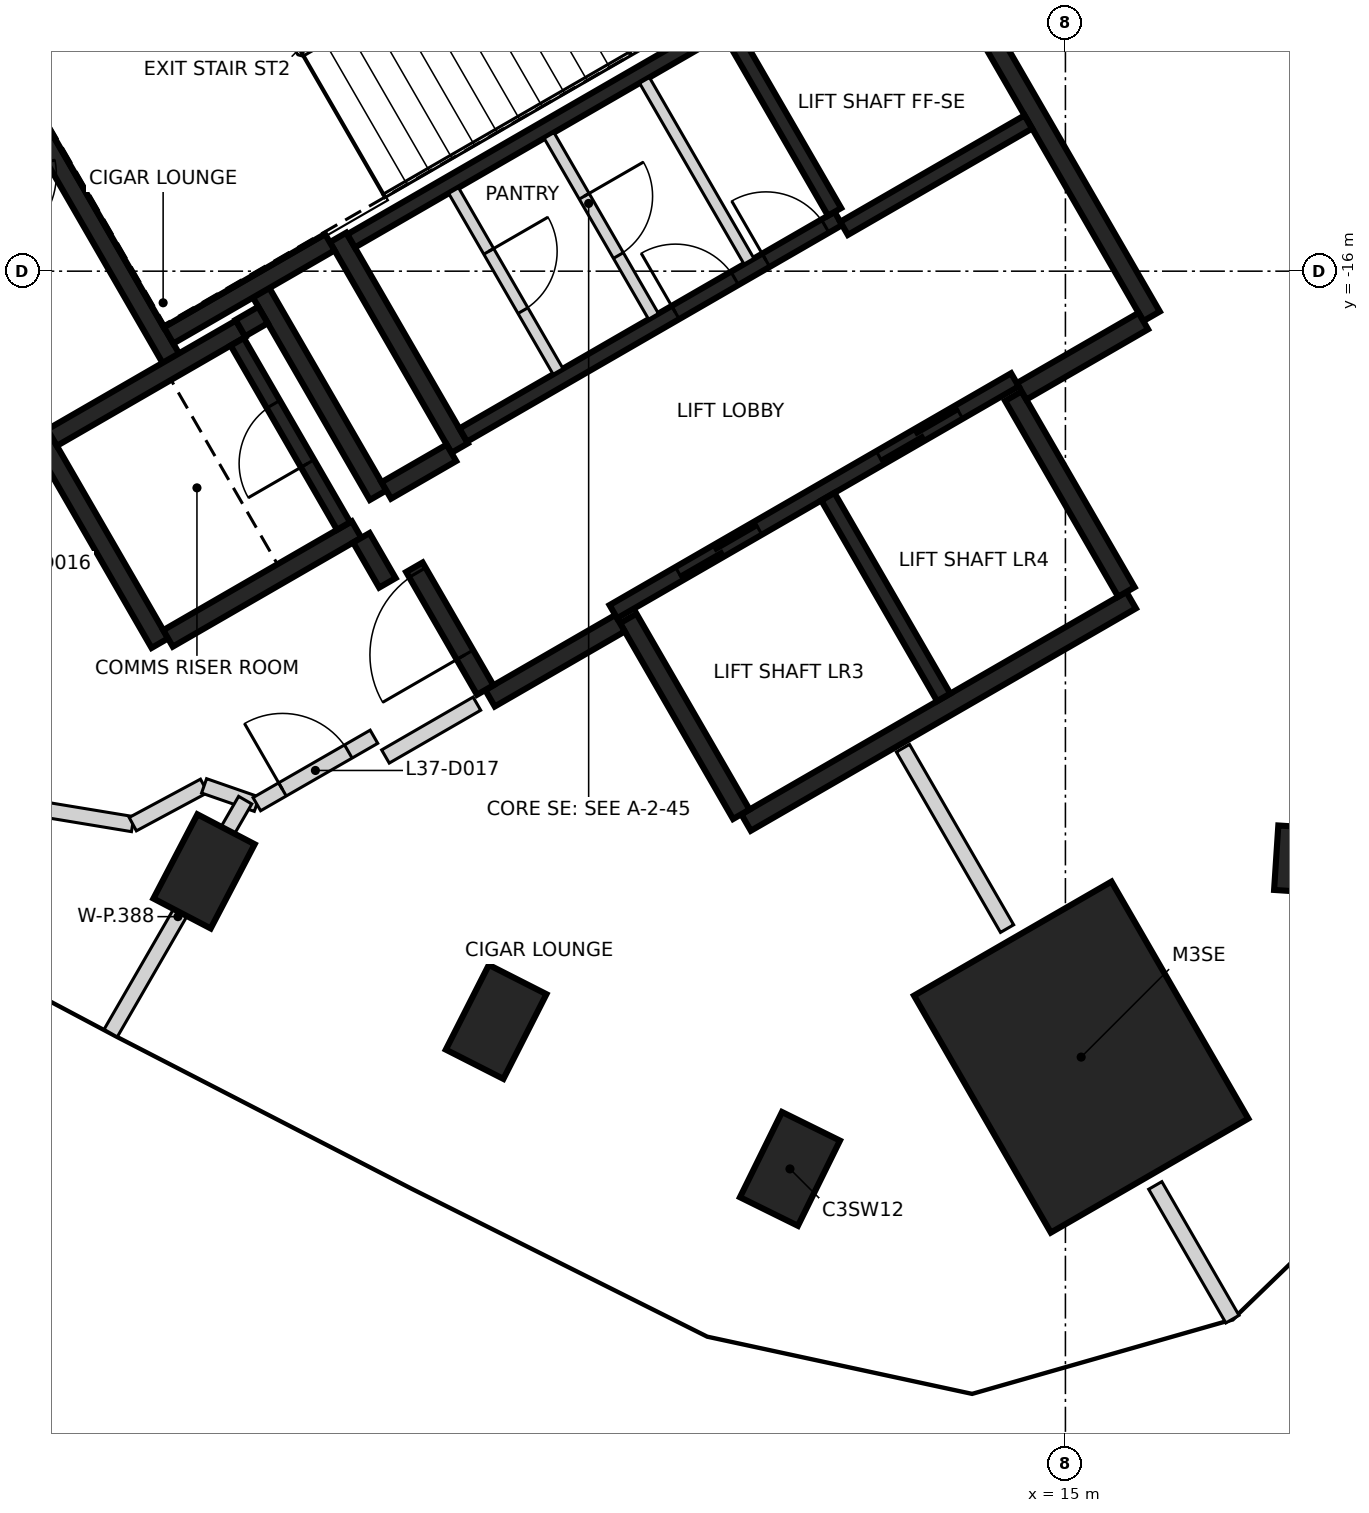
"""IFC4 building model, lengths in metres.
Left out: names, types, materials, properties, quantities, classifications, styles, units other than length and angle.
Written with IfcOpenShell. Run it as: python <this file> out.ifc"""

import sys

from ifc_helpers import new_model, si_unit, direction, frame, frame_2d, origin, origin_2d, place, context, subcontext, project, spatial, rectangle, extrude, element, fill, save


model = new_model("IFC4")
c1 = context("Model", 3, precision=1e-05, world=origin(), true_north=direction((0.0, 1.0)))
c2 = subcontext(c1, "Body", "Model", "MODEL_VIEW")
j1 = project(units=[si_unit("LENGTHUNIT", "METRE"), si_unit("PLANEANGLEUNIT", "RADIAN")], contexts=[c1])
p1 = place(None, origin())
s1 = spatial("IfcSite", under=j1, at=p1, CompositionType="ELEMENT")
p2 = place(p1, origin())
s2 = spatial("IfcBuilding", under=s1, at=p2, CompositionType="ELEMENT")
p3 = place(p2, frame((0.0, 0.0, 150.4)))
s3 = spatial("IfcBuildingStorey", under=s2, at=p3, CompositionType="ELEMENT", Elevation=150.4)
for number, where, z_axis, x_axis in (
    (1, (18.397, -23.757, -0.4), (0.0, 0.0, 1.0), (-0.998, 0.065, 0.0)),
    (2, (3.667, -23.896, -0.4), (0.0, 0.0, 1.0), (0.463, 0.886, 0.0)),
    (3, (7.51, -25.876, -0.4), (0.0, 0.0, 1.0), (0.453, 0.892, 0.0)),
    (4, (11.376, -27.811, -0.4), (0.0, 0.0, 1.0), (0.442, 0.897, 0.0)),
):
    element("IfcColumn", number, at=place(p3, frame(where, z_axis=z_axis, x_axis=x_axis)), inside=s3, PredefinedType="COLUMN", context=c2, shape_type="SweptSolid", body=[
        extrude(rectangle(XDim=1.25, YDim=0.85, at=origin_2d()), origin(), (0.0, 0.0, 1.0), 3.6),
    ])
p4 = place(p3, frame((15.207, -26.34, -0.4), z_axis=(0.0, 0.0, 1.0), x_axis=(-0.5, 0.866025403784, 0.0)))
e5 = element("IfcColumn", 5, at=p4, inside=s3, PredefinedType="COLUMN", context=c2, shape_type="SweptSolid", body=[
    extrude(rectangle(XDim=3.6, YDim=3.0, at=origin_2d()), origin(), (0.0, 0.0, 1.0), 3.6),
])
p5 = place(p3, frame((13.008, -11.181, 0.0), z_axis=(0.0, 0.0, 1.0), x_axis=(0.500004234368, -0.866022959057, 0.0)))
e6 = element("IfcWall", 6, at=p5, inside=s3, PredefinedType="SHEAR", context=c2, shape_type="SweptSolid", body=[
    extrude(rectangle(XDim=6.25, YDim=0.25, at=frame_2d((3.125, 0.0))), origin(), (0.0, 0.0, 1.0), 3.2),
])
p6 = place(p3, frame((15.865, -20.328, 0.0), z_axis=(0.0, 0.0, 1.0), x_axis=(-0.86602852612, -0.499994591916, 0.0)))
e7 = element("IfcWall", 7, at=p6, inside=s3, PredefinedType="SHEAR", context=c2, shape_type="SweptSolid", body=[
    extrude(rectangle(XDim=5.85, YDim=0.25, at=frame_2d((2.925, 0.0))), origin(), (0.0, 0.0, 1.0), 3.2),
])
p7 = place(p3, frame((3.235, -17.153, 0.0), z_axis=(0.0, 0.0, 1.0), x_axis=(-0.500008851346, 0.866020293397, 0.0)))
e8 = element("IfcWall", 8, at=p7, inside=s3, PredefinedType="SHEAR", context=c2, shape_type="SweptSolid", body=[
    extrude(rectangle(XDim=5.51, YDim=0.25, at=frame_2d((2.755, 0.0))), origin(), (0.0, 0.0, 1.0), 3.2),
])
p8 = place(p3, frame((7.031, -18.327, 0.0), z_axis=(0.0, 0.0, 1.0), x_axis=(-0.499971222258, 0.866042017984, 0.0)))
e9 = element("IfcWall", 9, at=p8, inside=s3, PredefinedType="SHEAR", context=c2, shape_type="SweptSolid", body=[
    extrude(rectangle(XDim=3.2, YDim=0.25, at=frame_2d((1.6, 0.0))), origin(), (0.0, 0.0, 1.0), 3.2),
])
for number, where, z_axis, x_axis in (
    (10, (14.315, -17.644, 0.0), (0.0, 0.0, 1.0), (0.5, -0.866, 0.0)),
    (11, (10.736, -23.145, 0.0), (0.0, 0.0, 1.0), (-0.5, 0.866, 0.0)),
):
    element("IfcWall", number, at=place(p3, frame(where, z_axis=z_axis, x_axis=x_axis)), inside=s3, PredefinedType="SHEAR", context=c2, shape_type="SweptSolid", body=[
        extrude(rectangle(XDim=2.974, YDim=0.25, at=frame_2d((1.487, 0.0))), origin(), (0.0, 0.0, 1.0), 3.2),
    ])
p9 = place(p3, frame((3.085, -20.894, 0.0), z_axis=(0.0, 0.0, 1.0), x_axis=(-0.499978833458, 0.866037623948, 0.0)))
e12 = element("IfcWall", 12, at=p9, inside=s3, PredefinedType="SHEAR", context=c2, shape_type="SweptSolid", body=[
    extrude(rectangle(XDim=3.05, YDim=0.25, at=frame_2d((1.525, 0.0))), origin(), (0.0, 0.0, 1.0), 3.2),
])
p10 = place(p3, frame((1.669, -18.19, 0.0), z_axis=(0.0, 0.0, 1.0), x_axis=(0.866042235819, 0.499970844928, 0.0)))
e13 = element("IfcWall", 13, at=p10, inside=s3, PredefinedType="SHEAR", context=c2, shape_type="SweptSolid", body=[
    extrude(rectangle(XDim=2.865, YDim=0.25, at=frame_2d((1.432, 0.0))), origin(), (0.0, 0.0, 1.0), 3.2),
])
p11 = place(p3, frame((5.675, -19.399, 0.0), z_axis=(0.0, 0.0, 1.0), x_axis=(-0.866026637627, -0.499997862916, 0.0)))
e14 = element("IfcWall", 14, at=p11, inside=s3, PredefinedType="SHEAR", context=c2, shape_type="SweptSolid", body=[
    extrude(rectangle(XDim=2.865, YDim=0.25, at=frame_2d((1.432, 0.0))), origin(), (0.0, 0.0, 1.0), 3.2),
])
p12 = place(p3, frame((4.414, -16.276, 0.0), z_axis=(0.0, 0.0, 1.0), x_axis=(0.500003324108, -0.866023484601, 0.0)))
e15 = element("IfcWall", 15, at=p12, inside=s3, PredefinedType="SHEAR", context=c2, shape_type="SweptSolid", body=[
    extrude(rectangle(XDim=3.085, YDim=0.25, at=frame_2d((1.542, 0.0))), origin(), (0.0, 0.0, 1.0), 3.2),
])
p13 = place(p3, frame((5.322, -15.619, 0.0), z_axis=(0.0, 0.0, 1.0), x_axis=(-0.866026229868, -0.499998569178, 0.0)))
e16 = element("IfcWall", 16, at=p13, inside=s3, PredefinedType="SHEAR", context=c2, shape_type="SweptSolid", body=[
    extrude(rectangle(XDim=2.449, YDim=0.25, at=frame_2d((1.225, 0.0))), origin(), (0.0, 0.0, 1.0), 3.2),
])
p14 = place(p3, frame((9.14, -20.631, 0.0), z_axis=(0.0, 0.0, 1.0), x_axis=(-0.866043531843, -0.499968599967, 0.0)))
e17 = element("IfcWall", 17, at=p14, inside=s3, PredefinedType="SHEAR", context=c2, shape_type="SweptSolid", body=[
    extrude(rectangle(XDim=1.975, YDim=0.25, at=frame_2d((0.987, 0.0))), origin(), (0.0, 0.0, 1.0), 3.2),
])
p15 = place(p3, frame((16.025, -16.656, 0.0), z_axis=(0.0, 0.0, 1.0), x_axis=(-0.866016279763, -0.500015802937, 0.0)))
e18 = element("IfcWall", 18, at=p15, inside=s3, PredefinedType="SHEAR", context=c2, shape_type="SweptSolid", body=[
    extrude(rectangle(XDim=1.849, YDim=0.25, at=frame_2d((0.925, 0.0))), origin(), (0.0, 0.0, 1.0), 3.2),
])
p16 = place(p3, frame((7.367, -21.51, 0.0), z_axis=(0.0, 0.0, 1.0), x_axis=(-0.499983108224, 0.866035156036, 0.0)))
e19 = element("IfcWall", 19, at=p16, inside=s3, PredefinedType="SHEAR", context=c2, shape_type="SweptSolid", body=[
    extrude(rectangle(XDim=1.865, YDim=0.25, at=frame_2d((0.932, 0.0))), origin(), (0.0, 0.0, 1.0), 3.2),
])
p17 = place(p16, frame((0.535, 0.0, 0.0)))
e20 = element("IfcOpeningElement", 20, at=p17, cuts=e19, PredefinedType="OPENING", context=c2, shape_type="SweptSolid", body=[
    extrude(rectangle(XDim=1.25, YDim=2.1, at=frame_2d((0.625, 1.05))), frame((0.0, 0.135, 0.0), z_axis=(0.0, -1.0, 0.0), x_axis=(1.0, 0.0, 0.0)), (0.0, 0.0, 1.0), 0.27),
])
p18 = place(p3, frame((6.065, -18.885, 0.0), z_axis=(0.0, 0.0, 1.0), x_axis=(0.866017078145, 0.500014420154, 0.0)))
e21 = element("IfcWall", 21, at=p18, inside=s3, PredefinedType="SHEAR", context=c2, shape_type="SweptSolid", body=[
    extrude(rectangle(XDim=0.989, YDim=0.25, at=frame_2d((0.495, 0.0))), origin(), (0.0, 0.0, 1.0), 3.2),
])
p19 = place(p3, frame((6.08, -20.1, 0.0), z_axis=(0.0, 0.0, 1.0), x_axis=(-0.500051773299, 0.865995510393, 0.0)))
e22 = element("IfcWall", 22, at=p19, inside=s3, PredefinedType="SHEAR", context=c2, shape_type="SweptSolid", body=[
    extrude(rectangle(XDim=0.685, YDim=0.25, at=frame_2d((0.342, 0.0))), origin(), (0.0, 0.0, 1.0), 3.2),
])
p20 = place(p3, frame((4.145, -16.749, 0.0), z_axis=(0.0, 0.0, 1.0), x_axis=(0.866185586049, 0.49972245349, 0.0)))
e23 = element("IfcWall", 23, at=p20, inside=s3, PredefinedType="SHEAR", context=c2, shape_type="SweptSolid", body=[
    extrude(rectangle(XDim=0.344, YDim=0.25, at=frame_2d((0.172, 0.0))), origin(), (0.0, 0.0, 1.0), 3.2),
])
p21 = place(p3, frame((9.052, -20.48, 0.0), z_axis=(0.0, 0.0, 1.0), x_axis=(0.866030299012, 0.499991521122, 0.0)))
e24 = element("IfcWall", 24, at=p21, inside=s3, PredefinedType="SHEAR", context=c2, shape_type="SweptSolid", body=[
    extrude(rectangle(XDim=6.1, YDim=0.2, at=frame_2d((3.05, 0.0))), origin(), (0.0, 0.0, 1.0), 3.2),
])
p22 = place(p21, frame((1.0, 0.0, 0.0)))
e25 = element("IfcOpeningElement", 25, at=p22, cuts=e24, PredefinedType="OPENING", context=c2, shape_type="SweptSolid", body=[
    extrude(rectangle(XDim=1.2, YDim=2.1, at=frame_2d((0.6, 1.05))), frame((0.0, 0.11, 0.0), z_axis=(0.0, -1.0, 0.0), x_axis=(1.0, 0.0, 0.0)), (0.0, 0.0, 1.0), 0.22),
])
p23 = place(p21, frame((4.05, 0.0, 0.0)))
e26 = element("IfcOpeningElement", 26, at=p23, cuts=e24, PredefinedType="OPENING", context=c2, shape_type="SweptSolid", body=[
    extrude(rectangle(XDim=1.2, YDim=2.1, at=frame_2d((0.6, 1.05))), frame((0.0, 0.11, 0.0), z_axis=(0.0, -1.0, 0.0), x_axis=(1.0, 0.0, 0.0)), (0.0, 0.0, 1.0), 0.22),
])
p24 = place(p3, frame((10.538, -12.752, 0.0), z_axis=(0.0, 0.0, 1.0), x_axis=(-0.866038630372, -0.499977090179, 0.0)))
e27 = element("IfcWall", 27, at=p24, inside=s3, PredefinedType="SHEAR", context=c2, shape_type="SweptSolid", body=[
    extrude(rectangle(XDim=5.699, YDim=0.2, at=frame_2d((2.85, 0.0))), origin(), (0.0, 0.0, 1.0), 3.2),
])
p25 = place(p3, frame((7.077, -18.156, 0.0), z_axis=(0.0, 0.0, 1.0), x_axis=(0.866038630372, 0.499977090179, 0.0)))
e28 = element("IfcWall", 28, at=p25, inside=s3, PredefinedType="SHEAR", context=c2, shape_type="SweptSolid", body=[
    extrude(rectangle(XDim=5.699, YDim=0.2, at=frame_2d((2.85, 0.0))), origin(), (0.0, 0.0, 1.0), 3.2),
])
p26 = place(p25, frame((3.224, 0.0, 0.0)))
e29 = element("IfcOpeningElement", 29, at=p26, cuts=e28, PredefinedType="OPENING", context=c2, shape_type="SweptSolid", body=[
    extrude(rectangle(XDim=0.9, YDim=2.1, at=frame_2d((0.45, 1.05))), frame((0.0, 0.11, 0.0), z_axis=(0.0, -1.0, 0.0), x_axis=(1.0, 0.0, 0.0)), (0.0, 0.0, 1.0), 0.22),
])
p27 = place(p25, frame((4.599, 0.0, 0.0)))
e30 = element("IfcOpeningElement", 30, at=p27, cuts=e28, PredefinedType="OPENING", context=c2, shape_type="SweptSolid", body=[
    extrude(rectangle(XDim=0.9, YDim=2.1, at=frame_2d((0.45, 1.05))), frame((0.0, 0.11, 0.0), z_axis=(0.0, -1.0, 0.0), x_axis=(1.0, 0.0, 0.0)), (0.0, 0.0, 1.0), 0.22),
])
p28 = place(p3, frame((11.875, -18.967, 0.0), z_axis=(0.0, 0.0, 1.0), x_axis=(0.49998131003, -0.866036194175, 0.0)))
e31 = element("IfcWall", 31, at=p28, inside=s3, PredefinedType="SHEAR", context=c2, shape_type="SweptSolid", body=[
    extrude(rectangle(XDim=3.048, YDim=0.2, at=frame_2d((1.524, 0.0))), origin(), (0.0, 0.0, 1.0), 3.2),
])
p29 = place(p3, frame((5.503, -19.352, 0.0), z_axis=(0.0, 0.0, 1.0), x_axis=(-0.499986818241, 0.866033014143, 0.0)))
e32 = element("IfcWall", 32, at=p29, inside=s3, PredefinedType="SHEAR", context=c2, shape_type="SweptSolid", body=[
    extrude(rectangle(XDim=2.798, YDim=0.2, at=frame_2d((1.399, 0.0))), origin(), (0.0, 0.0, 1.0), 3.2),
])
p30 = place(p29, frame((0.949, 0.0, 0.0)))
e33 = element("IfcOpeningElement", 33, at=p30, cuts=e32, PredefinedType="OPENING", context=c2, shape_type="SweptSolid", body=[
    extrude(rectangle(XDim=0.9, YDim=2.1, at=frame_2d((0.45, 1.05))), frame((0.0, 0.11, 0.0), z_axis=(0.0, -1.0, 0.0), x_axis=(1.0, 0.0, 0.0)), (0.0, 0.0, 1.0), 0.22),
])
p31 = place(p3, frame((11.963, -15.22, 0.0), z_axis=(0.0, 0.0, 1.0), x_axis=(-0.500034990121, 0.866005201286, 0.0)))
e34 = element("IfcWall", 34, at=p31, inside=s3, PredefinedType="SHEAR", context=c2, shape_type="SweptSolid", body=[
    extrude(rectangle(XDim=2.75, YDim=0.2, at=frame_2d((1.375, 0.0))), origin(), (0.0, 0.0, 1.0), 3.2),
])
p32 = place(p3, frame((14.512, -14.037, 0.0), z_axis=(0.0, 0.0, 1.0), x_axis=(-0.866044696403, -0.499966582715, 0.0)))
e35 = element("IfcWall", 35, at=p32, inside=s3, PredefinedType="SHEAR", context=c2, shape_type="SweptSolid", body=[
    extrude(rectangle(XDim=2.799, YDim=0.2, at=frame_2d((1.399, 0.0))), origin(), (0.0, 0.0, 1.0), 3.2),
])
p33 = place(p3, frame((8.207, -14.214, 0.0), z_axis=(0.0, 0.0, 1.0), x_axis=(0.50002746344, -0.86600954718, 0.0)))
e36 = element("IfcWall", 36, at=p33, inside=s3, PredefinedType="PARTITIONING", context=c2, shape_type="SweptSolid", body=[
    extrude(rectangle(XDim=2.748, YDim=0.15, at=frame_2d((1.374, 0.0))), origin(), (0.0, 0.0, 1.0), 3.2),
])
p34 = place(p33, frame((0.924, 0.0, 0.0)))
e37 = element("IfcOpeningElement", 37, at=p34, cuts=e36, PredefinedType="OPENING", context=c2, shape_type="SweptSolid", body=[
    extrude(rectangle(XDim=0.9, YDim=2.1, at=frame_2d((0.45, 1.05))), frame((0.0, 0.085, 0.0), z_axis=(0.0, -1.0, 0.0), x_axis=(1.0, 0.0, 0.0)), (0.0, 0.0, 1.0), 0.17),
])
p35 = place(p3, frame((9.462, -13.489, 0.0), z_axis=(0.0, 0.0, 1.0), x_axis=(0.499988999718, -0.866031754707, 0.0)))
e38 = element("IfcWall", 38, at=p35, inside=s3, PredefinedType="PARTITIONING", context=c2, shape_type="SweptSolid", body=[
    extrude(rectangle(XDim=2.749, YDim=0.15, at=frame_2d((1.374, 0.0))), origin(), (0.0, 0.0, 1.0), 3.2),
])
p36 = place(p3, frame((6.951, -14.939, 0.0), z_axis=(0.0, 0.0, 1.0), x_axis=(0.499988999718, -0.866031754707, 0.0)))
e39 = element("IfcWall", 39, at=p36, inside=s3, PredefinedType="PARTITIONING", context=c2, shape_type="SweptSolid", body=[
    extrude(rectangle(XDim=2.749, YDim=0.15, at=frame_2d((1.374, 0.0))), origin(), (0.0, 0.0, 1.0), 3.2),
])
p37 = place(p36, frame((0.924, 0.0, 0.0)))
e40 = element("IfcOpeningElement", 40, at=p37, cuts=e39, PredefinedType="OPENING", context=c2, shape_type="SweptSolid", body=[
    extrude(rectangle(XDim=0.9, YDim=2.1, at=frame_2d((0.45, 1.05))), frame((0.0, 0.085, 0.0), z_axis=(0.0, -1.0, 0.0), x_axis=(1.0, 0.0, 0.0)), (0.0, 0.0, 1.0), 0.17),
])
p38 = place(p3, frame((1.584, -23.086, 0.0), z_axis=(0.0, 0.0, 1.0), x_axis=(0.986654221629, -0.162829502674, 0.0)))
e41 = element("IfcWall", 41, at=p38, inside=s3, PredefinedType="PARTITIONING", context=c2, shape_type="SweptSolid", body=[
    extrude(rectangle(XDim=1.16, YDim=0.2, at=frame_2d((0.58, 0.0))), origin(), (0.0, 0.0, 1.0), 2.3),
])
p39 = place(p3, frame((2.73, -23.275, 0.0), z_axis=(0.0, 0.0, 1.0), x_axis=(0.880927165636, 0.473251866182, 0.0)))
e42 = element("IfcWall", 42, at=p39, inside=s3, PredefinedType="PARTITIONING", context=c2, shape_type="SweptSolid", body=[
    extrude(rectangle(XDim=1.065, YDim=0.2, at=frame_2d((0.532, 0.0))), origin(), (0.0, 0.0, 1.0), 3.2),
])
p40 = place(p3, frame((3.668, -22.771, 0.0), z_axis=(0.0, 0.0, 1.0), x_axis=(0.944447470761, -0.328662402738, 0.0)))
e43 = element("IfcWall", 43, at=p40, inside=s3, PredefinedType="PARTITIONING", context=c2, shape_type="SweptSolid", body=[
    extrude(rectangle(XDim=0.735, YDim=0.2, at=frame_2d((0.367, 0.0))), origin(), (0.0, 0.0, 1.0), 3.2),
])
p41 = place(p3, frame((4.362, -23.012, 0.0), z_axis=(0.0, 0.0, 1.0), x_axis=(0.866692617793, 0.49884256661, 0.0)))
e44 = element("IfcWall", 44, at=p41, inside=s3, PredefinedType="PARTITIONING", context=c2, shape_type="SweptSolid", body=[
    extrude(rectangle(XDim=1.778, YDim=0.2, at=frame_2d((0.889, 0.0))), origin(), (0.0, 0.0, 1.0), 3.2),
])
p42 = place(p41, frame((0.389, 0.0, 0.0)))
e45 = element("IfcOpeningElement", 45, at=p42, cuts=e44, PredefinedType="OPENING", context=c2, shape_type="SweptSolid", body=[
    extrude(rectangle(XDim=1.0, YDim=2.1, at=frame_2d((0.5, 1.05))), frame((0.0, 0.11, 0.0), z_axis=(0.0, -1.0, 0.0), x_axis=(1.0, 0.0, 0.0)), (0.0, 0.0, 1.0), 0.22),
])
p43 = place(p3, frame((6.054, -22.385, 0.0), z_axis=(0.0, 0.0, 1.0), x_axis=(0.86593101922, 0.500163443238, 0.0)))
e46 = element("IfcWall", 46, at=p43, inside=s3, PredefinedType="PARTITIONING", context=c2, shape_type="SweptSolid", body=[
    extrude(rectangle(XDim=1.39, YDim=0.2, at=frame_2d((0.695, 0.0))), origin(), (0.0, 0.0, 1.0), 3.2),
])
p44 = place(p3, frame((2.439, -26.024, 0.0), z_axis=(0.0, 0.0, 1.0), x_axis=(0.499989137667, 0.866031675065, 0.0)))
e47 = element("IfcWall", 47, at=p44, inside=s3, PredefinedType="PARTITIONING", context=c2, shape_type="SweptSolid", body=[
    extrude(rectangle(XDim=3.54, YDim=0.2, at=frame_2d((1.77, 0.0))), origin(), (0.0, 0.0, 1.0), 3.2),
])
p45 = place(p3, frame((12.863, -22.275, 0.0), z_axis=(0.0, 0.0, 1.0), x_axis=(0.49982784299, -0.866124775868, 0.0)))
e48 = element("IfcWall", 48, at=p45, inside=s3, PredefinedType="PARTITIONING", context=c2, shape_type="SweptSolid", body=[
    extrude(rectangle(XDim=2.741, YDim=0.2, at=frame_2d((1.37, 0.0))), origin(), (0.0, 0.0, 1.0), 3.2),
])
p46 = place(p3, frame((16.182, -28.028, 0.0), z_axis=(0.0, 0.0, 1.0), x_axis=(0.499836922991, -0.86611953587, 0.0)))
e49 = element("IfcWall", 49, at=p46, inside=s3, PredefinedType="PARTITIONING", context=c2, shape_type="SweptSolid", body=[
    extrude(rectangle(XDim=2.031, YDim=0.2, at=frame_2d((1.016, 0.0))), origin(), (0.0, 0.0, 1.0), 3.2),
])
p47 = place(p22, origin())
e50 = element("IfcDoor", 50, at=p47, inside=s3, OperationType="DOUBLE_DOOR_SLIDING", PredefinedType="DOOR", context=c2, shape_type="SweptSolid", body=[
    extrude(rectangle(XDim=1.2, YDim=2.1, at=frame_2d((0.6, 1.05))), frame((0.0, 0.025, 0.0), z_axis=(0.0, -1.0, 0.0), x_axis=(1.0, 0.0, 0.0)), (0.0, 0.0, 1.0), 0.05),
])
fill(e25, e50)
p48 = place(p23, origin())
e51 = element("IfcDoor", 51, at=p48, inside=s3, OperationType="DOUBLE_DOOR_SLIDING", PredefinedType="DOOR", context=c2, shape_type="SweptSolid", body=[
    extrude(rectangle(XDim=1.2, YDim=2.1, at=frame_2d((0.6, 1.05))), frame((0.0, 0.025, 0.0), z_axis=(0.0, -1.0, 0.0), x_axis=(1.0, 0.0, 0.0)), (0.0, 0.0, 1.0), 0.05),
])
fill(e26, e51)
p49 = place(p17, origin())
e52 = element("IfcDoor", 52, at=p49, inside=s3, OperationType="SINGLE_SWING_LEFT", PredefinedType="DOOR", context=c2, shape_type="SweptSolid", body=[
    extrude(rectangle(XDim=1.25, YDim=2.1, at=frame_2d((0.625, 1.05))), frame((0.0, 0.025, 0.0), z_axis=(0.0, -1.0, 0.0), x_axis=(1.0, 0.0, 0.0)), (0.0, 0.0, 1.0), 0.05),
])
fill(e20, e52)
p50 = place(p26, origin())
e53 = element("IfcDoor", 53, at=p50, inside=s3, OperationType="SINGLE_SWING_LEFT", PredefinedType="DOOR", context=c2, shape_type="SweptSolid", body=[
    extrude(rectangle(XDim=0.9, YDim=2.1, at=frame_2d((0.45, 1.05))), frame((0.0, 0.025, 0.0), z_axis=(0.0, -1.0, 0.0), x_axis=(1.0, 0.0, 0.0)), (0.0, 0.0, 1.0), 0.05),
])
fill(e29, e53)
p51 = place(p27, origin())
e54 = element("IfcDoor", 54, at=p51, inside=s3, OperationType="SINGLE_SWING_RIGHT", PredefinedType="DOOR", context=c2, shape_type="SweptSolid", body=[
    extrude(rectangle(XDim=0.9, YDim=2.1, at=frame_2d((0.45, 1.05))), frame((0.0, 0.025, 0.0), z_axis=(0.0, -1.0, 0.0), x_axis=(1.0, 0.0, 0.0)), (0.0, 0.0, 1.0), 0.05),
])
fill(e30, e54)
p52 = place(p30, origin())
e55 = element("IfcDoor", 55, at=p52, inside=s3, OperationType="SINGLE_SWING_LEFT", PredefinedType="DOOR", context=c2, shape_type="SweptSolid", body=[
    extrude(rectangle(XDim=0.9, YDim=2.1, at=frame_2d((0.45, 1.05))), frame((0.0, 0.025, 0.0), z_axis=(0.0, -1.0, 0.0), x_axis=(1.0, 0.0, 0.0)), (0.0, 0.0, 1.0), 0.05),
])
fill(e33, e55)
p53 = place(p34, origin())
e56 = element("IfcDoor", 56, at=p53, inside=s3, OperationType="SINGLE_SWING_RIGHT", PredefinedType="DOOR", context=c2, shape_type="SweptSolid", body=[
    extrude(rectangle(XDim=0.9, YDim=2.1, at=frame_2d((0.45, 1.05))), frame((0.0, 0.025, 0.0), z_axis=(0.0, -1.0, 0.0), x_axis=(1.0, 0.0, 0.0)), (0.0, 0.0, 1.0), 0.05),
])
fill(e37, e56)
p54 = place(p37, origin())
e57 = element("IfcDoor", 57, at=p54, inside=s3, OperationType="SINGLE_SWING_LEFT", PredefinedType="DOOR", context=c2, shape_type="SweptSolid", body=[
    extrude(rectangle(XDim=0.9, YDim=2.1, at=frame_2d((0.45, 1.05))), frame((0.0, 0.025, 0.0), z_axis=(0.0, -1.0, 0.0), x_axis=(1.0, 0.0, 0.0)), (0.0, 0.0, 1.0), 0.05),
])
fill(e40, e57)
p55 = place(p42, frame((1.0, 0.0, 0.0), z_axis=(0.0, 0.0, 1.0), x_axis=(-1.0, 0.0, 0.0)))
e58 = element("IfcDoor", 58, at=p55, inside=s3, OperationType="SINGLE_SWING_LEFT", PredefinedType="DOOR", context=c2, shape_type="SweptSolid", body=[
    extrude(rectangle(XDim=1.0, YDim=2.1, at=frame_2d((0.5, 1.05))), frame((0.0, 0.025, 0.0), z_axis=(0.0, -1.0, 0.0), x_axis=(1.0, 0.0, 0.0)), (0.0, 0.0, 1.0), 0.05),
])
fill(e45, e58)
save(model, sys.argv[1])
